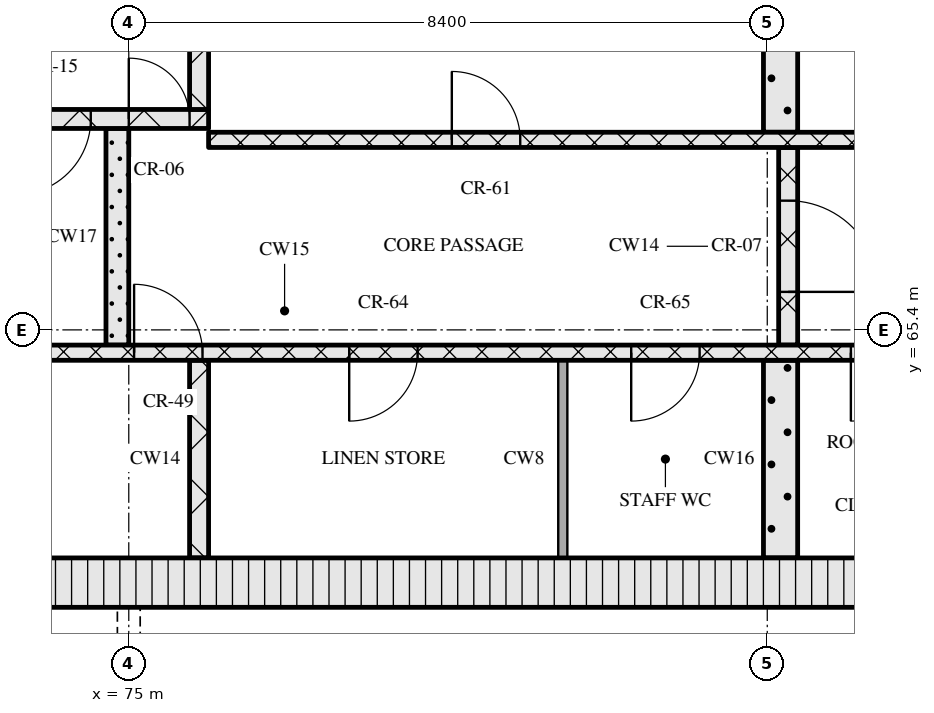
"""IFC4 building model, lengths in metres.
Left out: names, types, materials, properties, quantities, classifications, styles, units other than length and angle.
Written with IfcOpenShell. Run it as: python <this file> out.ifc"""

import sys

from ifc_helpers import new_model, si_unit, direction, frame, frame_2d, origin, place, context, subcontext, project, spatial, rectangle, extrude, element, fill, save


model = new_model("IFC4")
c1 = context("Model", 3, precision=1e-05, world=origin(), true_north=direction((0.0, 1.0)))
c2 = subcontext(c1, "Body", "Model", "MODEL_VIEW")
j1 = project(units=[si_unit("LENGTHUNIT", "METRE"), si_unit("PLANEANGLEUNIT", "RADIAN")], contexts=[c1])
p1 = place(None, origin())
s1 = spatial("IfcSite", under=j1, at=p1, CompositionType="ELEMENT")
p2 = place(p1, origin())
s2 = spatial("IfcBuilding", under=s1, at=p2, CompositionType="ELEMENT")
p3 = place(p2, frame((0.0, 0.0, 216.3)))
s3 = spatial("IfcBuildingStorey", under=s2, at=p3, CompositionType="ELEMENT", Elevation=216.3)
p4 = place(p3, frame((67.15, 62.075, 0.0), z_axis=(0.0, 0.0, 1.0), x_axis=(1.0, 0.0, 0.0)))
e1 = element("IfcWall", 1, at=p4, inside=s3, PredefinedType="SOLIDWALL", context=c2, shape_type="SweptSolid", body=[
    extrude(rectangle(XDim=40.9, YDim=0.65, at=frame_2d((20.45, 0.0))), origin(), (0.0, 0.0, 1.0), 3.32),
])
p5 = place(p4, frame((20.8, 0.0, 0.0)))
e2 = element("IfcOpeningElement", 2, at=p5, cuts=e1, PredefinedType="OPENING", context=c2, shape_type="SweptSolid", body=[
    extrude(rectangle(XDim=1.8, YDim=2.1, at=frame_2d((0.9, 1.05))), frame((0.0, 0.335, 0.0), z_axis=(0.0, -1.0, 0.0), x_axis=(1.0, 0.0, 0.0)), (0.0, 0.0, 1.0), 0.67),
])
p6 = place(p3, frame((75.925, 62.4, 0.0), z_axis=(0.0, 0.0, 1.0), x_axis=(0.0, 1.0, 0.0)))
e3 = element("IfcWall", 3, at=p6, inside=s3, PredefinedType="SOLIDWALL", context=c2, shape_type="SweptSolid", body=[
    extrude(rectangle(XDim=2.6, YDim=0.25, at=frame_2d((1.3, 0.0))), origin(), (0.0, 0.0, 1.0), 3.32),
])
p7 = place(p3, frame((80.71, 62.4, 0.0), z_axis=(0.0, 0.0, 1.0), x_axis=(0.0, 1.0, 0.0)))
e4 = element("IfcWall", 4, at=p7, inside=s3, PredefinedType="PARTITIONING", context=c2, shape_type="SweptSolid", body=[
    extrude(rectangle(XDim=2.6, YDim=0.12, at=frame_2d((1.3, 0.0))), origin(), (0.0, 0.0, 1.0), 3.32),
])
p8 = place(p3, frame((83.575, 62.4, 0.0), z_axis=(0.0, 0.0, 1.0), x_axis=(0.0, 1.0, 0.0)))
e5 = element("IfcWall", 5, at=p8, inside=s3, PredefinedType="SOLIDWALL", context=c2, shape_type="SweptSolid", body=[
    extrude(rectangle(XDim=2.6, YDim=0.45, at=frame_2d((1.3, 0.0))), origin(), (0.0, 0.0, 1.0), 3.32),
])
p9 = place(p3, frame((67.8, 65.1, 0.0), z_axis=(0.0, 0.0, 1.0), x_axis=(1.0, 0.0, 0.0)))
e6 = element("IfcWall", 6, at=p9, inside=s3, PredefinedType="SOLIDWALL", context=c2, shape_type="SweptSolid", body=[
    extrude(rectangle(XDim=18.5, YDim=0.2, at=frame_2d((9.25, 0.0))), origin(), (0.0, 0.0, 1.0), 3.32),
])
p10 = place(p9, frame((7.27, 0.0, 0.0)))
e7 = element("IfcOpeningElement", 7, at=p10, cuts=e6, PredefinedType="OPENING", context=c2, shape_type="SweptSolid", body=[
    extrude(rectangle(XDim=0.9, YDim=2.1, at=frame_2d((0.45, 1.05))), frame((0.0, 0.11, 0.0), z_axis=(0.0, -1.0, 0.0), x_axis=(1.0, 0.0, 0.0)), (0.0, 0.0, 1.0), 0.22),
])
p11 = place(p9, frame((10.1, 0.0, 0.0)))
e8 = element("IfcOpeningElement", 8, at=p11, cuts=e6, PredefinedType="OPENING", context=c2, shape_type="SweptSolid", body=[
    extrude(rectangle(XDim=0.9, YDim=2.1, at=frame_2d((0.45, 1.05))), frame((0.0, 0.11, 0.0), z_axis=(0.0, -1.0, 0.0), x_axis=(1.0, 0.0, 0.0)), (0.0, 0.0, 1.0), 0.22),
])
p12 = place(p9, frame((13.81, 0.0, 0.0)))
e9 = element("IfcOpeningElement", 9, at=p12, cuts=e6, PredefinedType="OPENING", context=c2, shape_type="SweptSolid", body=[
    extrude(rectangle(XDim=0.9, YDim=2.1, at=frame_2d((0.45, 1.05))), frame((0.0, 0.11, 0.0), z_axis=(0.0, -1.0, 0.0), x_axis=(1.0, 0.0, 0.0)), (0.0, 0.0, 1.0), 0.22),
])
p13 = place(p9, frame((16.7, 0.0, 0.0)))
e10 = element("IfcOpeningElement", 10, at=p13, cuts=e6, PredefinedType="OPENING", context=c2, shape_type="SweptSolid", body=[
    extrude(rectangle(XDim=0.9, YDim=2.1, at=frame_2d((0.45, 1.05))), frame((0.0, 0.11, 0.0), z_axis=(0.0, -1.0, 0.0), x_axis=(1.0, 0.0, 0.0)), (0.0, 0.0, 1.0), 0.22),
])
p14 = place(p3, frame((74.85, 65.2, 0.0), z_axis=(0.0, 0.0, 1.0), x_axis=(0.0, 1.0, 0.0)))
e11 = element("IfcWall", 11, at=p14, inside=s3, PredefinedType="SOLIDWALL", context=c2, shape_type="SweptSolid", body=[
    extrude(rectangle(XDim=2.85, YDim=0.3, at=frame_2d((1.425, 0.0))), origin(), (0.0, 0.0, 1.0), 3.32),
])
p15 = place(p3, frame((83.675, 65.2, 0.0), z_axis=(0.0, 0.0, 1.0), x_axis=(0.0, 1.0, 0.0)))
e12 = element("IfcWall", 12, at=p15, inside=s3, PredefinedType="SOLIDWALL", context=c2, shape_type="SweptSolid", body=[
    extrude(rectangle(XDim=2.6, YDim=0.25, at=frame_2d((1.3, 0.0))), origin(), (0.0, 0.0, 1.0), 3.32),
])
p16 = place(p15, frame((0.7, 0.0, 0.0)))
e13 = element("IfcOpeningElement", 13, at=p16, cuts=e12, PredefinedType="OPENING", context=c2, shape_type="SweptSolid", body=[
    extrude(rectangle(XDim=1.2, YDim=2.1, at=frame_2d((0.6, 1.05))), frame((0.0, 0.135, 0.0), z_axis=(0.0, -1.0, 0.0), x_axis=(1.0, 0.0, 0.0)), (0.0, 0.0, 1.0), 0.27),
])
p17 = place(p3, frame((76.05, 67.9, 0.0), z_axis=(0.0, 0.0, 1.0), x_axis=(1.0, 0.0, 0.0)))
e14 = element("IfcWall", 14, at=p17, inside=s3, PredefinedType="SOLIDWALL", context=c2, shape_type="SweptSolid", body=[
    extrude(rectangle(XDim=23.1, YDim=0.2, at=frame_2d((11.55, 0.0))), origin(), (0.0, 0.0, 1.0), 3.32),
])
p18 = place(p17, frame((3.2, 0.0, 0.0)))
e15 = element("IfcOpeningElement", 15, at=p18, cuts=e14, PredefinedType="OPENING", context=c2, shape_type="SweptSolid", body=[
    extrude(rectangle(XDim=0.9, YDim=2.1, at=frame_2d((0.45, 1.05))), frame((0.0, 0.11, 0.0), z_axis=(0.0, -1.0, 0.0), x_axis=(1.0, 0.0, 0.0)), (0.0, 0.0, 1.0), 0.22),
])
p19 = place(p17, frame((9.7, 0.0, 0.0)))
e16 = element("IfcOpeningElement", 16, at=p19, cuts=e14, PredefinedType="OPENING", context=c2, shape_type="SweptSolid", body=[
    extrude(rectangle(XDim=0.9, YDim=2.1, at=frame_2d((0.45, 1.05))), frame((0.0, 0.11, 0.0), z_axis=(0.0, -1.0, 0.0), x_axis=(1.0, 0.0, 0.0)), (0.0, 0.0, 1.0), 0.22),
])
p20 = place(p17, frame((13.55, 0.0, 0.0)))
e17 = element("IfcOpeningElement", 17, at=p20, cuts=e14, PredefinedType="OPENING", context=c2, shape_type="SweptSolid", body=[
    extrude(rectangle(XDim=1.0, YDim=2.1, at=frame_2d((0.5, 1.05))), frame((0.0, 0.11, 0.0), z_axis=(0.0, -1.0, 0.0), x_axis=(1.0, 0.0, 0.0)), (0.0, 0.0, 1.0), 0.22),
])
p21 = place(p17, frame((16.2, 0.0, 0.0)))
e18 = element("IfcOpeningElement", 18, at=p21, cuts=e14, PredefinedType="OPENING", context=c2, shape_type="SweptSolid", body=[
    extrude(rectangle(XDim=1.1, YDim=2.1, at=frame_2d((0.55, 1.05))), frame((0.0, 0.11, 0.0), z_axis=(0.0, -1.0, 0.0), x_axis=(1.0, 0.0, 0.0)), (0.0, 0.0, 1.0), 0.22),
])
p22 = place(p17, frame((18.7, 0.0, 0.0)))
e19 = element("IfcOpeningElement", 19, at=p22, cuts=e14, PredefinedType="OPENING", context=c2, shape_type="SweptSolid", body=[
    extrude(rectangle(XDim=1.1, YDim=2.1, at=frame_2d((0.55, 1.05))), frame((0.0, 0.11, 0.0), z_axis=(0.0, -1.0, 0.0), x_axis=(1.0, 0.0, 0.0)), (0.0, 0.0, 1.0), 0.22),
])
p23 = place(p17, frame((21.2, 0.0, 0.0)))
e20 = element("IfcOpeningElement", 20, at=p23, cuts=e14, PredefinedType="OPENING", context=c2, shape_type="SweptSolid", body=[
    extrude(rectangle(XDim=1.1, YDim=2.1, at=frame_2d((0.55, 1.05))), frame((0.0, 0.11, 0.0), z_axis=(0.0, -1.0, 0.0), x_axis=(1.0, 0.0, 0.0)), (0.0, 0.0, 1.0), 0.22),
])
p24 = place(p3, frame((83.575, 68.0, 0.0), z_axis=(0.0, 0.0, 1.0), x_axis=(0.0, 1.0, 0.0)))
e21 = element("IfcWall", 21, at=p24, inside=s3, PredefinedType="SOLIDWALL", context=c2, shape_type="SweptSolid", body=[
    extrude(rectangle(XDim=2.6, YDim=0.45, at=frame_2d((1.3, 0.0))), origin(), (0.0, 0.0, 1.0), 3.32),
])
p25 = place(p3, frame((67.8, 68.175, 0.0), z_axis=(0.0, 0.0, 1.0), x_axis=(1.0, 0.0, 0.0)))
e22 = element("IfcWall", 22, at=p25, inside=s3, PredefinedType="SOLIDWALL", context=c2, shape_type="SweptSolid", body=[
    extrude(rectangle(XDim=8.25, YDim=0.25, at=frame_2d((4.125, 0.0))), origin(), (0.0, 0.0, 1.0), 3.32),
])
p26 = place(p25, frame((5.7, 0.0, 0.0)))
e23 = element("IfcOpeningElement", 23, at=p26, cuts=e22, PredefinedType="OPENING", context=c2, shape_type="SweptSolid", body=[
    extrude(rectangle(XDim=1.0, YDim=2.1, at=frame_2d((0.5, 1.05))), frame((0.0, 0.135, 0.0), z_axis=(0.0, -1.0, 0.0), x_axis=(1.0, 0.0, 0.0)), (0.0, 0.0, 1.0), 0.27),
])
p27 = place(p25, frame((7.2, 0.0, 0.0)))
e24 = element("IfcOpeningElement", 24, at=p27, cuts=e22, PredefinedType="OPENING", context=c2, shape_type="SweptSolid", body=[
    extrude(rectangle(XDim=0.8, YDim=2.1, at=frame_2d((0.4, 1.05))), frame((0.0, 0.135, 0.0), z_axis=(0.0, -1.0, 0.0), x_axis=(1.0, 0.0, 0.0)), (0.0, 0.0, 1.0), 0.27),
])
p28 = place(p3, frame((75.925, 68.3, 0.0), z_axis=(0.0, 0.0, 1.0), x_axis=(0.0, 1.0, 0.0)))
e25 = element("IfcWall", 25, at=p28, inside=s3, PredefinedType="SOLIDWALL", context=c2, shape_type="SweptSolid", body=[
    extrude(rectangle(XDim=2.3, YDim=0.25, at=frame_2d((1.15, 0.0))), origin(), (0.0, 0.0, 1.0), 3.32),
])
p29 = place(p10, origin())
e26 = element("IfcDoor", 26, at=p29, inside=s3, OperationType="SINGLE_SWING_LEFT", PredefinedType="DOOR", context=c2, shape_type="SweptSolid", body=[
    extrude(rectangle(XDim=0.9, YDim=2.1, at=frame_2d((0.45, 1.05))), frame((0.0, 0.025, 0.0), z_axis=(0.0, -1.0, 0.0), x_axis=(1.0, 0.0, 0.0)), (0.0, 0.0, 1.0), 0.05),
])
fill(e7, e26)
p30 = place(p11, origin())
e27 = element("IfcDoor", 27, at=p30, inside=s3, OperationType="SINGLE_SWING_RIGHT", PredefinedType="DOOR", context=c2, shape_type="SweptSolid", body=[
    extrude(rectangle(XDim=0.9, YDim=2.1, at=frame_2d((0.45, 1.05))), frame((0.0, 0.025, 0.0), z_axis=(0.0, -1.0, 0.0), x_axis=(1.0, 0.0, 0.0)), (0.0, 0.0, 1.0), 0.05),
])
fill(e8, e27)
p31 = place(p12, origin())
e28 = element("IfcDoor", 28, at=p31, inside=s3, OperationType="SINGLE_SWING_RIGHT", PredefinedType="DOOR", context=c2, shape_type="SweptSolid", body=[
    extrude(rectangle(XDim=0.9, YDim=2.1, at=frame_2d((0.45, 1.05))), frame((0.0, 0.025, 0.0), z_axis=(0.0, -1.0, 0.0), x_axis=(1.0, 0.0, 0.0)), (0.0, 0.0, 1.0), 0.05),
])
fill(e9, e28)
p32 = place(p13, origin())
e29 = element("IfcDoor", 29, at=p32, inside=s3, OperationType="SINGLE_SWING_RIGHT", PredefinedType="DOOR", context=c2, shape_type="SweptSolid", body=[
    extrude(rectangle(XDim=0.9, YDim=2.1, at=frame_2d((0.45, 1.05))), frame((0.0, 0.025, 0.0), z_axis=(0.0, -1.0, 0.0), x_axis=(1.0, 0.0, 0.0)), (0.0, 0.0, 1.0), 0.05),
])
fill(e10, e29)
p33 = place(p16, origin())
e30 = element("IfcDoor", 30, at=p33, inside=s3, OperationType="SINGLE_SWING_RIGHT", PredefinedType="DOOR", context=c2, shape_type="SweptSolid", body=[
    extrude(rectangle(XDim=1.2, YDim=2.1, at=frame_2d((0.6, 1.05))), frame((0.0, 0.025, 0.0), z_axis=(0.0, -1.0, 0.0), x_axis=(1.0, 0.0, 0.0)), (0.0, 0.0, 1.0), 0.05),
])
fill(e13, e30)
p34 = place(p18, origin())
e31 = element("IfcDoor", 31, at=p34, inside=s3, OperationType="SINGLE_SWING_LEFT", PredefinedType="DOOR", context=c2, shape_type="SweptSolid", body=[
    extrude(rectangle(XDim=0.9, YDim=2.1, at=frame_2d((0.45, 1.05))), frame((0.0, 0.025, 0.0), z_axis=(0.0, -1.0, 0.0), x_axis=(1.0, 0.0, 0.0)), (0.0, 0.0, 1.0), 0.05),
])
fill(e15, e31)
p35 = place(p26, origin())
e32 = element("IfcDoor", 32, at=p35, inside=s3, OperationType="SINGLE_SWING_RIGHT", PredefinedType="DOOR", context=c2, shape_type="SweptSolid", body=[
    extrude(rectangle(XDim=1.0, YDim=2.1, at=frame_2d((0.5, 1.05))), frame((0.0, 0.025, 0.0), z_axis=(0.0, -1.0, 0.0), x_axis=(1.0, 0.0, 0.0)), (0.0, 0.0, 1.0), 0.05),
])
fill(e23, e32)
p36 = place(p27, origin())
e33 = element("IfcDoor", 33, at=p36, inside=s3, OperationType="SINGLE_SWING_LEFT", PredefinedType="DOOR", context=c2, shape_type="SweptSolid", body=[
    extrude(rectangle(XDim=0.8, YDim=2.1, at=frame_2d((0.4, 1.05))), frame((0.0, 0.025, 0.0), z_axis=(0.0, -1.0, 0.0), x_axis=(1.0, 0.0, 0.0)), (0.0, 0.0, 1.0), 0.05),
])
fill(e24, e33)
save(model, sys.argv[1])
